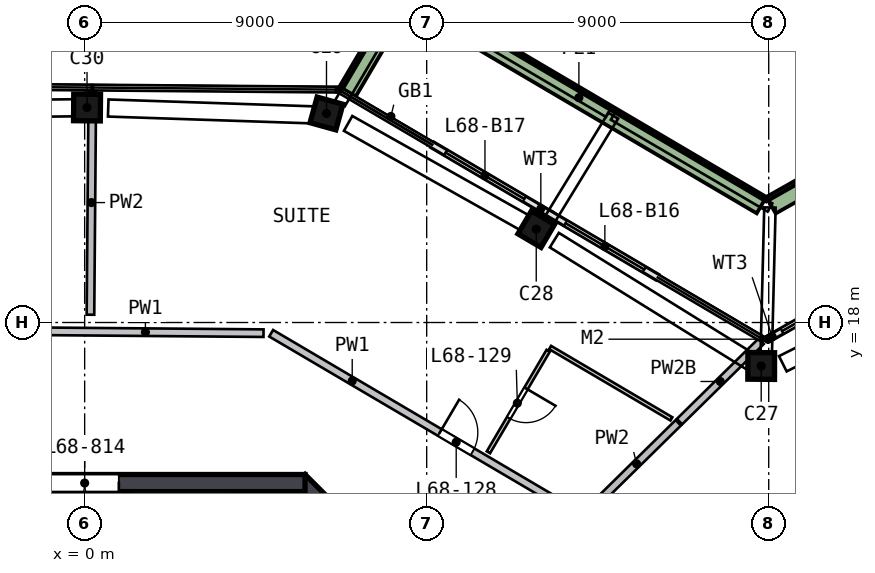
"""IFC4 building model, lengths in metres.
Left out: names, types, materials, properties, quantities, classifications, styles, units other than length and angle.
Written with IfcOpenShell. Run it as: python <this file> out.ifc"""

import sys

from ifc_helpers import new_model, si_unit, direction, frame, frame_2d, origin, origin_2d, place, context, subcontext, project, spatial, polyline, rectangle, outline, extrude, element, fill, save


model = new_model("IFC4")
c1 = context("Model", 3, precision=1e-05, world=origin(), true_north=direction((0.0, 1.0)))
c2 = subcontext(c1, "Body", "Model", "MODEL_VIEW")
j1 = project(units=[si_unit("LENGTHUNIT", "METRE"), si_unit("PLANEANGLEUNIT", "RADIAN")], contexts=[c1])
p1 = place(None, origin())
s1 = spatial("IfcSite", under=j1, at=p1, CompositionType="ELEMENT")
p2 = place(p1, origin())
s2 = spatial("IfcBuilding", under=s1, at=p2, CompositionType="ELEMENT")
p3 = place(p2, frame((0.0, 0.0, 277.5)))
s3 = spatial("IfcBuildingStorey", under=s2, at=p3, CompositionType="ELEMENT", Elevation=277.5)
p4 = place(p3, frame((17.899, 16.754, 0.0), z_axis=(-0.080421043, 0.084449696, 0.993177076), x_axis=(0.996727785, -0.001318707, 0.080820686)))
e1 = element("IfcColumn", 1, at=p4, inside=s3, PredefinedType="COLUMN", context=c2, shape_type="SweptSolid", body=[
    extrude(rectangle(XDim=0.7, YDim=0.7, at=origin_2d()), origin(), (0.0, 0.0, 1.0), 3.212),
])
p5 = place(p3, frame((12.0, 20.389, 0.0), z_axis=(-0.097493601, 0.056275557, 0.993643829), x_axis=(-0.8563225, 0.504024539, -0.112565713)))
e2 = element("IfcColumn", 2, at=p5, inside=s3, PredefinedType="COLUMN", context=c2, shape_type="SweptSolid", body=[
    extrude(rectangle(XDim=0.7, YDim=0.7, at=origin_2d()), origin(), (0.0, 0.0, 1.0), 3.21),
])
p6 = place(p3, frame((6.499, 23.465, 0.0), z_axis=(-0.111825315, 0.029951852, 0.993276389), x_axis=(0.95724027, -0.265122623, 0.115762953)))
e3 = element("IfcColumn", 3, at=p6, inside=s3, PredefinedType="COLUMN", context=c2, shape_type="SweptSolid", body=[
    extrude(rectangle(XDim=0.7, YDim=0.7, at=origin_2d()), origin(), (0.0, 0.0, 1.0), 3.211),
])
p7 = place(p3, frame((0.198, 23.657, 0.0), z_axis=(-0.112551351, 0.0, 0.99364591), x_axis=(-0.993610589, 0.008431586, -0.11254735)))
e4 = element("IfcColumn", 4, at=p7, inside=s3, PredefinedType="COLUMN", context=c2, shape_type="SweptSolid", body=[
    extrude(rectangle(XDim=0.7, YDim=0.7, at=origin_2d()), origin(), (0.0, 0.0, 1.0), 3.21),
])
p8 = place(p3, frame((13.841, 5.64, 0.0), z_axis=(0.0, 0.0, 1.0), x_axis=(-0.707106781, 0.707106781, 0.0)))
e5 = element("IfcWall", 5, at=p8, inside=s3, PredefinedType="SHEAR", context=c2, shape_type="SweptSolid", body=[
    extrude(rectangle(XDim=11.598, YDim=0.45, at=frame_2d((5.799, 0.0))), origin(), (0.0, 0.0, 1.0), 3.5),
])
p9 = place(p8, frame((2.099, 0.0, 0.0)))
e6 = element("IfcOpeningElement", 6, at=p9, cuts=e5, PredefinedType="OPENING", context=c2, shape_type="SweptSolid", body=[
    extrude(rectangle(XDim=1.2, YDim=2.1, at=frame_2d((0.6, 1.05))), frame((0.0, 0.235, 0.0), z_axis=(0.0, -1.0, 0.0), x_axis=(1.0, 0.0, 0.0)), (0.0, 0.0, 1.0), 0.47),
])
p10 = place(p3, frame((5.799, 13.775, 0.0), z_axis=(0.0, 0.0, 1.0), x_axis=(-1.0, 0.0, 0.0)))
e7 = element("IfcWall", 7, at=p10, inside=s3, PredefinedType="SHEAR", context=c2, shape_type="SweptSolid", body=[
    extrude(rectangle(XDim=11.598, YDim=0.45, at=frame_2d((5.799, 0.0))), origin(), (0.0, 0.0, 1.0), 3.5),
])
p11 = place(p10, frame((4.899, 0.0, 0.0)))
e8 = element("IfcOpeningElement", 8, at=p11, cuts=e7, PredefinedType="OPENING", context=c2, shape_type="SweptSolid", body=[
    extrude(rectangle(XDim=1.8, YDim=2.1, at=frame_2d((0.9, 1.05))), frame((0.0, 0.235, 0.0), z_axis=(0.0, -1.0, 0.0), x_axis=(1.0, 0.0, 0.0)), (0.0, 0.0, 1.0), 0.47),
])
p12 = place(p3, frame((20.789, 19.155, 0.0), z_axis=(0.0, 0.0, 1.0), x_axis=(-0.87018032, -0.492733407, 0.0)))
e9 = element("IfcWall", 9, at=p12, inside=s3, PredefinedType="SOLIDWALL", context=c2, shape_type="SweptSolid", body=[
    extrude(rectangle(XDim=3.2, YDim=0.15, at=frame_2d((1.6, 0.0))), origin(), (0.0, 0.0, 1.0), 2.525),
])
p13 = place(p12, frame((0.4, 0.0, 0.0)))
e10 = element("IfcOpeningElement", 10, at=p13, cuts=e9, PredefinedType="OPENING", context=c2, shape_type="SweptSolid", body=[
    extrude(rectangle(XDim=2.4, YDim=2.4, at=frame_2d((1.2, 1.2))), frame((0.0, 0.085, 0.0), z_axis=(0.0, -1.0, 0.0), x_axis=(1.0, 0.0, 0.0)), (0.0, 0.0, 1.0), 0.17),
])
p14 = place(p3, frame((15.068, 19.193, 0.0), z_axis=(0.0, 0.0, 1.0), x_axis=(-0.86182992, 0.507197387, 0.0)))
e11 = element("IfcWall", 11, at=p14, inside=s3, PredefinedType="SOLIDWALL", context=c2, shape_type="SweptSolid", body=[
    extrude(rectangle(XDim=3.25, YDim=0.15, at=frame_2d((1.625, 0.0))), origin(), (0.0, 0.0, 1.0), 2.525),
])
p15 = place(p14, frame((0.4, 0.0, 0.0)))
e12 = element("IfcOpeningElement", 12, at=p15, cuts=e11, PredefinedType="OPENING", context=c2, shape_type="SweptSolid", body=[
    extrude(rectangle(XDim=2.4, YDim=2.4, at=frame_2d((1.2, 1.2))), frame((0.0, 0.085, 0.0), z_axis=(0.0, -1.0, 0.0), x_axis=(1.0, 0.0, 0.0)), (0.0, 0.0, 1.0), 0.17),
])
p16 = place(p3, frame((12.267, 20.841, 0.0), z_axis=(0.0, 0.0, 1.0), x_axis=(-0.861793405, 0.507259427, 0.0)))
e13 = element("IfcWall", 13, at=p16, inside=s3, PredefinedType="SOLIDWALL", context=c2, shape_type="SweptSolid", body=[
    extrude(rectangle(XDim=3.611, YDim=0.15, at=frame_2d((1.806, 0.0))), origin(), (0.0, 0.0, 1.0), 2.525),
])
p17 = place(p16, frame((0.811, 0.0, 0.0)))
e14 = element("IfcOpeningElement", 14, at=p17, cuts=e13, PredefinedType="OPENING", context=c2, shape_type="SweptSolid", body=[
    extrude(rectangle(XDim=2.4, YDim=2.4, at=frame_2d((1.2, 1.2))), frame((0.0, 0.085, 0.0), z_axis=(0.0, -1.0, 0.0), x_axis=(1.0, 0.0, 0.0)), (0.0, 0.0, 1.0), 0.17),
])
p18 = place(p3, frame((28.451, 26.97, 0.0), z_axis=(0.0, 0.0, 1.0), x_axis=(-0.870182922, -0.492728812, 0.0)))
e15 = element("IfcWall", 15, at=p18, inside=s3, PredefinedType="SOLIDWALL", context=c2, shape_type="SweptSolid", body=[
    extrude(rectangle(XDim=11.941, YDim=0.5, at=frame_2d((5.97, 0.0))), origin(), (0.0, 0.0, 1.0), 0.7),
])
p19 = place(p3, frame((17.811, 21.088, 0.0), z_axis=(0.0, 0.0, 1.0), x_axis=(-0.861800811, 0.507246846, 0.0)))
e16 = element("IfcWall", 16, at=p19, inside=s3, PredefinedType="SOLIDWALL", context=c2, shape_type="SweptSolid", body=[
    extrude(rectangle(XDim=11.152, YDim=0.5, at=frame_2d((5.576, 0.0))), origin(), (0.0, 0.0, 1.0), 0.7),
])
p20 = place(p3, frame((8.288, 26.403, 0.0), z_axis=(0.0, 0.0, 1.0), x_axis=(-0.507281009, -0.861780702, 0.0)))
e17 = element("IfcWall", 17, at=p20, inside=s3, PredefinedType="SOLIDWALL", context=c2, shape_type="SweptSolid", body=[
    extrude(rectangle(XDim=2.699, YDim=0.5, at=frame_2d((1.35, 0.0))), origin(), (0.0, 0.0, 1.0), 0.7),
])
p21 = place(p3, origin())
e18 = element("IfcWall", 18, at=p21, inside=s3, PredefinedType="SOLIDWALL", context=c2, shape_type="SweptSolid", body=[
    extrude(outline(polyline([(3.9, 9.9), (3.7, 9.9), (3.7, 12.9), (1.4, 12.9), (1.4, 9.9), (1.2, 9.9), (1.2, 13.55), (3.9, 13.55), (3.9, 9.9)])), origin(), (0.0, 0.0, 1.0), 3.19),
])
p22 = place(p3, frame((-4.609, 17.798, 0.0), z_axis=(0.0, 0.0, 1.0), x_axis=(0.999964836, -0.008386109, 0.0)))
e19 = element("IfcWall", 19, at=p22, inside=s3, PredefinedType="SOLIDWALL", context=c2, shape_type="SweptSolid", body=[
    extrude(rectangle(XDim=9.316, YDim=0.2, at=frame_2d((4.658, 0.0))), origin(), (0.0, 0.0, 1.0), 3.19),
])
p23 = place(p22, frame((1.9, 0.0, 0.0)))
e20 = element("IfcOpeningElement", 20, at=p23, cuts=e19, PredefinedType="OPENING", context=c2, shape_type="SweptSolid", body=[
    extrude(rectangle(XDim=1.0, YDim=2.1, at=frame_2d((0.5, 1.05))), frame((0.0, 0.11, 0.0), z_axis=(0.0, -1.0, 0.0), x_axis=(1.0, 0.0, 0.0)), (0.0, 0.0, 1.0), 0.22),
])
p24 = place(p3, frame((4.907, 17.718, 0.0), z_axis=(0.0, 0.0, 1.0), x_axis=(0.861809555, -0.507231989, 0.0)))
e21 = element("IfcWall", 21, at=p24, inside=s3, PredefinedType="SOLIDWALL", context=c2, shape_type="SweptSolid", body=[
    extrude(rectangle(XDim=9.316, YDim=0.2, at=frame_2d((4.658, 0.0))), origin(), (0.0, 0.0, 1.0), 3.19),
])
p25 = place(p24, frame((5.15, 0.0, 0.0)))
e22 = element("IfcOpeningElement", 22, at=p25, cuts=e21, PredefinedType="OPENING", context=c2, shape_type="SweptSolid", body=[
    extrude(rectangle(XDim=1.0, YDim=2.1, at=frame_2d((0.5, 1.05))), frame((0.0, 0.11, 0.0), z_axis=(0.0, -1.0, 0.0), x_axis=(1.0, 0.0, 0.0)), (0.0, 0.0, 1.0), 0.22),
])
p26 = place(p3, frame((0.153, 18.205, 0.0), z_axis=(0.0, 0.0, 1.0), x_axis=(0.008355102, 0.999965096, 0.0)))
e23 = element("IfcWall", 23, at=p26, inside=s3, PredefinedType="SOLIDWALL", context=c2, shape_type="SweptSolid", body=[
    extrude(rectangle(XDim=5.903, YDim=0.2, at=frame_2d((2.951, 0.0))), origin(), (0.0, 0.0, 1.0), 3.19),
])
p27 = place(p3, frame((13.427, 13.204, 0.0), z_axis=(0.0, 0.0, 1.0), x_axis=(0.712997217, 0.701166862, 0.0)))
e24 = element("IfcWall", 24, at=p27, inside=s3, PredefinedType="SOLIDWALL", context=c2, shape_type="SweptSolid", body=[
    extrude(rectangle(XDim=3.075, YDim=0.2, at=frame_2d((1.538, 0.0))), origin(), (0.0, 0.0, 1.0), 3.19),
])
p28 = place(p3, frame((15.652, 15.392, 0.0), z_axis=(0.0, 0.0, 1.0), x_axis=(0.713000038, 0.701163994, 0.0)))
e25 = element("IfcWall", 25, at=p28, inside=s3, PredefinedType="SOLIDWALL", context=c2, shape_type="SweptSolid", body=[
    extrude(rectangle(XDim=3.011, YDim=0.2, at=frame_2d((1.506, 0.0))), origin(), (0.0, 0.0, 1.0), 2.69),
])
p29 = place(p3, frame((14.818, 10.277, 0.0), z_axis=(0.0, 0.0, 1.0), x_axis=(0.870181146, 0.492731948, 0.0)))
e26 = element("IfcWall", 26, at=p29, inside=s3, PredefinedType="SOLIDWALL", context=c2, shape_type="SweptSolid", body=[
    extrude(rectangle(XDim=10.252, YDim=0.2, at=frame_2d((5.126, 0.0))), origin(), (0.0, 0.0, 1.0), 3.19),
])
p30 = place(p29, frame((2.95, 0.0, 0.0)))
e27 = element("IfcOpeningElement", 27, at=p30, cuts=e26, PredefinedType="OPENING", context=c2, shape_type="SweptSolid", body=[
    extrude(rectangle(XDim=1.0, YDim=2.1, at=frame_2d((0.5, 1.05))), frame((0.0, 0.11, 0.0), z_axis=(0.0, -1.0, 0.0), x_axis=(1.0, 0.0, 0.0)), (0.0, 0.0, 1.0), 0.22),
])
p31 = place(p3, frame((12.197, 17.256, 0.0), z_axis=(0.0, 0.0, 1.0), x_axis=(-0.5072507, -0.861798542, 0.0)))
e28 = element("IfcWall", 28, at=p31, inside=s3, PredefinedType="PARTITIONING", context=c2, shape_type="SweptSolid", body=[
    extrude(rectangle(XDim=3.1, YDim=0.1, at=frame_2d((1.55, 0.0))), origin(), (0.0, 0.0, 1.0), 3.19),
])
p32 = place(p31, frame((1.15, 0.0, 0.0)))
e29 = element("IfcOpeningElement", 29, at=p32, cuts=e28, PredefinedType="OPENING", context=c2, shape_type="SweptSolid", body=[
    extrude(rectangle(XDim=0.9, YDim=2.1, at=frame_2d((0.45, 1.05))), frame((0.0, 0.06, 0.0), z_axis=(0.0, -1.0, 0.0), x_axis=(1.0, 0.0, 0.0)), (0.0, 0.0, 1.0), 0.12),
])
p33 = place(p3, frame((12.248, 17.343, 0.0), z_axis=(0.0, 0.0, 1.0), x_axis=(0.861795243, -0.507256305, 0.0)))
e30 = element("IfcWall", 30, at=p33, inside=s3, PredefinedType="PARTITIONING", context=c2, shape_type="SweptSolid", body=[
    extrude(rectangle(XDim=3.704, YDim=0.1, at=frame_2d((1.852, 0.0))), origin(), (0.0, 0.0, 1.0), 3.19),
])
p34 = place(p13, origin())
e31 = element("IfcDoor", 31, at=p34, inside=s3, OperationType="SLIDING_TO_RIGHT", PredefinedType="DOOR", context=c2, shape_type="SweptSolid", body=[
    extrude(rectangle(XDim=2.4, YDim=2.4, at=frame_2d((1.2, 1.2))), frame((0.0, 0.025, 0.0), z_axis=(0.0, -1.0, 0.0), x_axis=(1.0, 0.0, 0.0)), (0.0, 0.0, 1.0), 0.05),
])
fill(e10, e31)
p35 = place(p15, origin())
e32 = element("IfcDoor", 32, at=p35, inside=s3, OperationType="SLIDING_TO_RIGHT", PredefinedType="DOOR", context=c2, shape_type="SweptSolid", body=[
    extrude(rectangle(XDim=2.4, YDim=2.4, at=frame_2d((1.2, 1.2))), frame((0.0, 0.025, 0.0), z_axis=(0.0, -1.0, 0.0), x_axis=(1.0, 0.0, 0.0)), (0.0, 0.0, 1.0), 0.05),
])
fill(e12, e32)
p36 = place(p17, origin())
e33 = element("IfcDoor", 33, at=p36, inside=s3, OperationType="SLIDING_TO_LEFT", PredefinedType="DOOR", context=c2, shape_type="SweptSolid", body=[
    extrude(rectangle(XDim=2.4, YDim=2.4, at=frame_2d((1.2, 1.2))), frame((0.0, 0.025, 0.0), z_axis=(0.0, -1.0, 0.0), x_axis=(1.0, 0.0, 0.0)), (0.0, 0.0, 1.0), 0.05),
])
fill(e14, e33)
p37 = place(p11, origin())
e34 = element("IfcDoor", 34, at=p37, inside=s3, OperationType="DOUBLE_DOOR_SINGLE_SWING", PredefinedType="DOOR", context=c2, shape_type="SweptSolid", body=[
    extrude(rectangle(XDim=1.8, YDim=2.1, at=frame_2d((0.9, 1.05))), frame((0.0, 0.025, 0.0), z_axis=(0.0, -1.0, 0.0), x_axis=(1.0, 0.0, 0.0)), (0.0, 0.0, 1.0), 0.05),
])
fill(e8, e34)
p38 = place(p25, origin())
e35 = element("IfcDoor", 35, at=p38, inside=s3, OperationType="SINGLE_SWING_LEFT", PredefinedType="DOOR", context=c2, shape_type="SweptSolid", body=[
    extrude(rectangle(XDim=1.0, YDim=2.1, at=frame_2d((0.5, 1.05))), frame((0.0, 0.025, 0.0), z_axis=(0.0, -1.0, 0.0), x_axis=(1.0, 0.0, 0.0)), (0.0, 0.0, 1.0), 0.05),
])
fill(e22, e35)
p39 = place(p32, origin())
e36 = element("IfcDoor", 36, at=p39, inside=s3, OperationType="SINGLE_SWING_LEFT", PredefinedType="DOOR", context=c2, shape_type="SweptSolid", body=[
    extrude(rectangle(XDim=0.9, YDim=2.1, at=frame_2d((0.45, 1.05))), frame((0.0, 0.025, 0.0), z_axis=(0.0, -1.0, 0.0), x_axis=(1.0, 0.0, 0.0)), (0.0, 0.0, 1.0), 0.05),
])
fill(e29, e36)
save(model, sys.argv[1])
